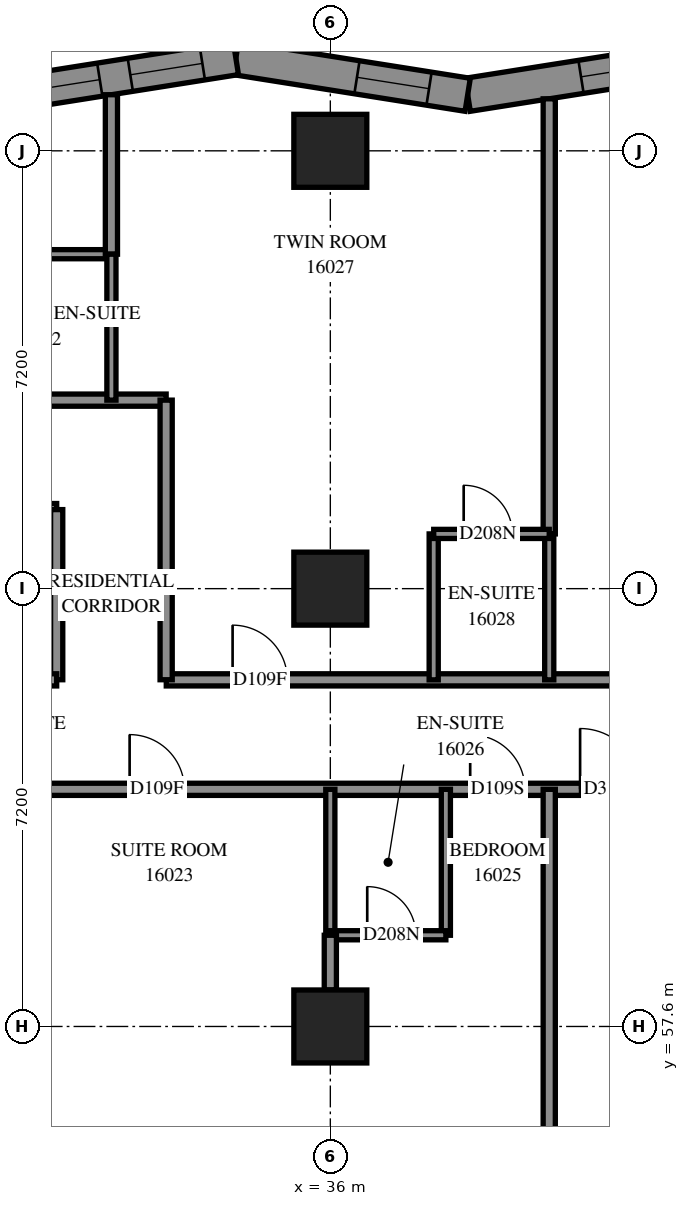
"""IFC4 building model, lengths in metres.
Left out: names, types, materials, properties, quantities, classifications, styles, units other than length and angle.
Written with IfcOpenShell. Run it as: python <this file> out.ifc"""

import sys

from ifc_helpers import new_model, si_unit, direction, frame, frame_2d, origin, origin_2d, place, context, subcontext, project, spatial, polyline, rectangle, outline, extrude, element, fill, save


model = new_model("IFC4")
c1 = context("Model", 3, precision=1e-05, world=origin(), true_north=direction((0.0, 1.0)))
c2 = subcontext(c1, "Body", "Model", "MODEL_VIEW")
j1 = project(units=[si_unit("LENGTHUNIT", "METRE"), si_unit("PLANEANGLEUNIT", "RADIAN")], contexts=[c1])
p1 = place(None, origin())
s1 = spatial("IfcSite", under=j1, at=p1, CompositionType="ELEMENT")
p2 = place(p1, origin())
s2 = spatial("IfcBuilding", under=s1, at=p2, CompositionType="ELEMENT")
p3 = place(p2, frame((0.0, 0.0, 61.0)))
s3 = spatial("IfcBuildingStorey", under=s2, at=p3, CompositionType="ELEMENT", Elevation=61.0)
for number, where, z_axis, x_axis in (
    (1, (36.0, 57.6, 0.0), (0.0, 0.0, 1.0), (1.0, 0.0, 0.0)),
    (2, (36.0, 64.8, 0.0), (0.0, 0.0, 1.0), (1.0, 0.0, 0.0)),
    (3, (36.0, 72.0, 0.0), (0.0, 0.0, 1.0), (1.0, 0.0, 0.0)),
):
    element("IfcColumn", number, at=place(p3, frame(where, z_axis=z_axis, x_axis=x_axis)), inside=s3, PredefinedType="COLUMN", context=c2, shape_type="SweptSolid", body=[
        extrude(rectangle(XDim=1.2, YDim=1.2, at=origin_2d()), origin(), (0.0, 0.0, 1.0), 3.1),
    ])
p4 = place(p3, frame((42.071, 73.525, 0.0), z_axis=(0.0, 0.0, 1.0), x_axis=(-0.9877213372, -0.1562259905, 0.0)))
e4 = element("IfcWall", 4, at=p4, inside=s3, PredefinedType="SOLIDWALL", context=c2, shape_type="SweptSolid", body=[
    extrude(outline(polyline([(-0.043, -0.275), (3.816, -0.275), (3.903, 0.275), (0.043, 0.275), (-0.043, -0.275)])), origin(), (0.0, 0.0, 1.0), 3.1),
])
p5 = place(p4, frame((0.773, 0.0, 0.5)))
e5 = element("IfcOpeningElement", 5, at=p5, cuts=e4, PredefinedType="OPENING", context=c2, shape_type="SweptSolid", body=[
    extrude(rectangle(XDim=1.2, YDim=2.45, at=frame_2d((0.6, 1.225))), frame((0.0, 0.285, 0.0), z_axis=(0.0, -1.0, 0.0), x_axis=(1.0, 0.0, 0.0)), (0.0, 0.0, 1.0), 0.57),
])
p6 = place(p3, frame((38.259, 72.922, 0.0), z_axis=(0.0, 0.0, 1.0), x_axis=(-0.9877213372, 0.1562259905, 0.0)))
e6 = element("IfcWall", 6, at=p6, inside=s3, PredefinedType="SOLIDWALL", context=c2, shape_type="SweptSolid", body=[
    extrude(outline(polyline([(0.043, -0.275), (3.903, -0.275), (3.816, 0.275), (-0.043, 0.275), (0.043, -0.275)])), origin(), (0.0, 0.0, 1.0), 3.1),
])
p7 = place(p6, frame((0.643, 0.0, 0.5)))
e7 = element("IfcOpeningElement", 7, at=p7, cuts=e6, PredefinedType="OPENING", context=c2, shape_type="SweptSolid", body=[
    extrude(rectangle(XDim=1.2, YDim=2.45, at=frame_2d((0.6, 1.225))), frame((0.0, 0.285, 0.0), z_axis=(0.0, -1.0, 0.0), x_axis=(1.0, 0.0, 0.0)), (0.0, 0.0, 1.0), 0.57),
])
p8 = place(p3, frame((34.447, 73.525, 0.0), z_axis=(0.0, 0.0, 1.0), x_axis=(-0.9877213372, -0.1562259905, 0.0)))
e8 = element("IfcWall", 8, at=p8, inside=s3, PredefinedType="SOLIDWALL", context=c2, shape_type="SweptSolid", body=[
    extrude(outline(polyline([(-0.043, -0.275), (3.816, -0.275), (3.903, 0.275), (0.043, 0.275), (-0.043, -0.275)])), origin(), (0.0, 0.0, 1.0), 3.1),
])
p9 = place(p8, frame((0.558, 0.0, 0.5)))
e9 = element("IfcOpeningElement", 9, at=p9, cuts=e8, PredefinedType="OPENING", context=c2, shape_type="SweptSolid", body=[
    extrude(rectangle(XDim=1.2, YDim=2.45, at=frame_2d((0.6, 1.225))), frame((0.0, 0.285, 0.0), z_axis=(0.0, -1.0, 0.0), x_axis=(1.0, 0.0, 0.0)), (0.0, 0.0, 1.0), 0.57),
])
p10 = place(p8, frame((2.266, 0.0, 0.5)))
e10 = element("IfcOpeningElement", 10, at=p10, cuts=e8, PredefinedType="OPENING", context=c2, shape_type="SweptSolid", body=[
    extrude(rectangle(XDim=1.2, YDim=2.45, at=frame_2d((0.6, 1.225))), frame((0.0, 0.285, 0.0), z_axis=(0.0, -1.0, 0.0), x_axis=(1.0, 0.0, 0.0)), (0.0, 0.0, 1.0), 0.57),
])
p11 = place(p3, frame((28.8, 61.5, 0.0), z_axis=(0.0, 0.0, 1.0), x_axis=(1.0, 0.0, 0.0)))
e11 = element("IfcWall", 11, at=p11, inside=s3, PredefinedType="PARTITIONING", context=c2, shape_type="SweptSolid", body=[
    extrude(rectangle(XDim=24.3, YDim=0.2, at=frame_2d((12.15, 0.0))), origin(), (0.0, 0.0, 1.0), 3.1),
])
p12 = place(p11, frame((3.899, 0.0, 0.0)))
e12 = element("IfcOpeningElement", 12, at=p12, cuts=e11, PredefinedType="OPENING", context=c2, shape_type="SweptSolid", body=[
    extrude(rectangle(XDim=0.9, YDim=2.1, at=frame_2d((0.45, 1.05))), frame((0.0, 0.11, 0.0), z_axis=(0.0, -1.0, 0.0), x_axis=(1.0, 0.0, 0.0)), (0.0, 0.0, 1.0), 0.22),
])
p13 = place(p11, frame((9.5, 0.0, 0.0)))
e13 = element("IfcOpeningElement", 13, at=p13, cuts=e11, PredefinedType="OPENING", context=c2, shape_type="SweptSolid", body=[
    extrude(rectangle(XDim=0.9, YDim=2.1, at=frame_2d((0.45, 1.05))), frame((0.0, 0.11, 0.0), z_axis=(0.0, -1.0, 0.0), x_axis=(1.0, 0.0, 0.0)), (0.0, 0.0, 1.0), 0.22),
])
p14 = place(p11, frame((11.307, 0.0, 0.0)))
e14 = element("IfcOpeningElement", 14, at=p14, cuts=e11, PredefinedType="OPENING", context=c2, shape_type="SweptSolid", body=[
    extrude(rectangle(XDim=1.0, YDim=2.1, at=frame_2d((0.5, 1.05))), frame((0.0, 0.11, 0.0), z_axis=(0.0, -1.0, 0.0), x_axis=(1.0, 0.0, 0.0)), (0.0, 0.0, 1.0), 0.22),
])
p15 = place(p11, frame((16.7, 0.0, 0.0)))
e15 = element("IfcOpeningElement", 15, at=p15, cuts=e11, PredefinedType="OPENING", context=c2, shape_type="SweptSolid", body=[
    extrude(rectangle(XDim=0.9, YDim=2.1, at=frame_2d((0.45, 1.05))), frame((0.0, 0.11, 0.0), z_axis=(0.0, -1.0, 0.0), x_axis=(1.0, 0.0, 0.0)), (0.0, 0.0, 1.0), 0.22),
])
p16 = place(p11, frame((18.508, 0.0, 0.0)))
e16 = element("IfcOpeningElement", 16, at=p16, cuts=e11, PredefinedType="OPENING", context=c2, shape_type="SweptSolid", body=[
    extrude(rectangle(XDim=1.0, YDim=2.1, at=frame_2d((0.5, 1.05))), frame((0.0, 0.11, 0.0), z_axis=(0.0, -1.0, 0.0), x_axis=(1.0, 0.0, 0.0)), (0.0, 0.0, 1.0), 0.22),
])
p17 = place(p11, frame((23.033, 0.0, 0.0)))
e17 = element("IfcOpeningElement", 17, at=p17, cuts=e11, PredefinedType="OPENING", context=c2, shape_type="SweptSolid", body=[
    extrude(rectangle(XDim=1.0, YDim=2.1, at=frame_2d((0.5, 1.05))), frame((0.0, 0.11, 0.0), z_axis=(0.0, -1.0, 0.0), x_axis=(1.0, 0.0, 0.0)), (0.0, 0.0, 1.0), 0.22),
])
p18 = place(p3, frame((33.302, 63.3, 0.0), z_axis=(0.0, 0.0, 1.0), x_axis=(1.0, 0.0, 0.0)))
e18 = element("IfcWall", 18, at=p18, inside=s3, PredefinedType="PARTITIONING", context=c2, shape_type="SweptSolid", body=[
    extrude(rectangle(XDim=21.798, YDim=0.2, at=frame_2d((10.899, 0.0))), origin(), (0.0, 0.0, 1.0), 3.1),
])
p19 = place(p18, frame((1.091, 0.0, 0.0)))
e19 = element("IfcOpeningElement", 19, at=p19, cuts=e18, PredefinedType="OPENING", context=c2, shape_type="SweptSolid", body=[
    extrude(rectangle(XDim=0.9, YDim=2.1, at=frame_2d((0.45, 1.05))), frame((0.0, 0.11, 0.0), z_axis=(0.0, -1.0, 0.0), x_axis=(1.0, 0.0, 0.0)), (0.0, 0.0, 1.0), 0.22),
])
p20 = place(p18, frame((8.248, 0.0, 0.0)))
e20 = element("IfcOpeningElement", 20, at=p20, cuts=e18, PredefinedType="OPENING", context=c2, shape_type="SweptSolid", body=[
    extrude(rectangle(XDim=0.9, YDim=2.1, at=frame_2d((0.45, 1.05))), frame((0.0, 0.11, 0.0), z_axis=(0.0, -1.0, 0.0), x_axis=(1.0, 0.0, 0.0)), (0.0, 0.0, 1.0), 0.22),
])
p21 = place(p18, frame((15.448, 0.0, 0.0)))
e21 = element("IfcOpeningElement", 21, at=p21, cuts=e18, PredefinedType="OPENING", context=c2, shape_type="SweptSolid", body=[
    extrude(rectangle(XDim=0.9, YDim=2.1, at=frame_2d((0.45, 1.05))), frame((0.0, 0.11, 0.0), z_axis=(0.0, -1.0, 0.0), x_axis=(1.0, 0.0, 0.0)), (0.0, 0.0, 1.0), 0.22),
])
p22 = place(p3, frame((21.602, 67.9, 0.0), z_axis=(0.0, 0.0, 1.0), x_axis=(1.0, 0.0, 0.0)))
e22 = element("IfcWall", 22, at=p22, inside=s3, PredefinedType="PARTITIONING", context=c2, shape_type="SweptSolid", body=[
    extrude(rectangle(XDim=11.698, YDim=0.2, at=frame_2d((5.849, 0.0))), origin(), (0.0, 0.0, 1.0), 3.1),
])
p23 = place(p22, frame((5.955, 0.0, 0.0)))
e23 = element("IfcOpeningElement", 23, at=p23, cuts=e22, PredefinedType="OPENING", context=c2, shape_type="SweptSolid", body=[
    extrude(rectangle(XDim=0.9, YDim=2.1, at=frame_2d((0.45, 1.05))), frame((0.0, 0.11, 0.0), z_axis=(0.0, -1.0, 0.0), x_axis=(1.0, 0.0, 0.0)), (0.0, 0.0, 1.0), 0.22),
])
p24 = place(p3, frame((21.6, 66.1, 0.0), z_axis=(0.0, 0.0, 1.0), x_axis=(1.0, 0.0, 0.0)))
e24 = element("IfcWall", 24, at=p24, inside=s3, PredefinedType="PARTITIONING", context=c2, shape_type="SweptSolid", body=[
    extrude(rectangle(XDim=9.9, YDim=0.2, at=frame_2d((4.95, 0.0))), origin(), (0.0, 0.0, 1.0), 3.1),
])
p25 = place(p24, frame((5.314, 0.0, 0.0)))
e25 = element("IfcOpeningElement", 25, at=p25, cuts=e24, PredefinedType="OPENING", context=c2, shape_type="SweptSolid", body=[
    extrude(rectangle(XDim=1.0, YDim=2.1, at=frame_2d((0.5, 1.05))), frame((0.0, 0.11, 0.0), z_axis=(0.0, -1.0, 0.0), x_axis=(1.0, 0.0, 0.0)), (0.0, 0.0, 1.0), 0.22),
])
p26 = place(p3, frame((39.6, 65.7, 0.0), z_axis=(0.0, 0.0, 1.0), x_axis=(0.0, 1.0, 0.0)))
e26 = element("IfcWall", 26, at=p26, inside=s3, PredefinedType="PARTITIONING", context=c2, shape_type="SweptSolid", body=[
    extrude(rectangle(XDim=7.155, YDim=0.2, at=frame_2d((3.578, 0.0))), origin(), (0.0, 0.0, 1.0), 3.1),
])
p27 = place(p3, frame((39.6, 55.747, 0.0), z_axis=(0.0, 0.0, 1.0), x_axis=(0.0, 1.0, 0.0)))
e27 = element("IfcWall", 27, at=p27, inside=s3, PredefinedType="PARTITIONING", context=c2, shape_type="SweptSolid", body=[
    extrude(rectangle(XDim=5.753, YDim=0.2, at=frame_2d((2.877, 0.0))), origin(), (0.0, 0.0, 1.0), 3.1),
])
p28 = place(p3, frame((33.3, 63.302, 0.0), z_axis=(0.0, 0.0, 1.0), x_axis=(0.0, 1.0, 0.0)))
e28 = element("IfcWall", 28, at=p28, inside=s3, PredefinedType="PARTITIONING", context=c2, shape_type="SweptSolid", body=[
    extrude(rectangle(XDim=4.598, YDim=0.2, at=frame_2d((2.299, 0.0))), origin(), (0.0, 0.0, 1.0), 3.1),
])
p29 = place(p3, frame((29.2, 70.3, 0.0), z_axis=(0.0, 0.0, 1.0), x_axis=(1.0, 0.0, 0.0)))
e29 = element("IfcWall", 29, at=p29, inside=s3, PredefinedType="PARTITIONING", context=c2, shape_type="SweptSolid", body=[
    extrude(rectangle(XDim=3.2, YDim=0.15, at=frame_2d((1.6, 0.0))), origin(), (0.0, 0.0, 1.0), 3.1),
])
p30 = place(p29, frame((1.204, 0.0, 0.0)))
e30 = element("IfcOpeningElement", 30, at=p30, cuts=e29, PredefinedType="OPENING", context=c2, shape_type="SweptSolid", body=[
    extrude(rectangle(XDim=0.8, YDim=2.1, at=frame_2d((0.4, 1.05))), frame((0.0, 0.085, 0.0), z_axis=(0.0, -1.0, 0.0), x_axis=(1.0, 0.0, 0.0)), (0.0, 0.0, 1.0), 0.17),
])
p31 = place(p3, frame((31.5, 63.302, 0.0), z_axis=(0.0, 0.0, 1.0), x_axis=(0.0, 1.0, 0.0)))
e31 = element("IfcWall", 31, at=p31, inside=s3, PredefinedType="PARTITIONING", context=c2, shape_type="SweptSolid", body=[
    extrude(rectangle(XDim=2.798, YDim=0.2, at=frame_2d((1.399, 0.0))), origin(), (0.0, 0.0, 1.0), 3.1),
])
p32 = place(p3, frame((28.802, 63.3, 0.0), z_axis=(0.0, 0.0, 1.0), x_axis=(1.0, 0.0, 0.0)))
e32 = element("IfcWall", 32, at=p32, inside=s3, PredefinedType="PARTITIONING", context=c2, shape_type="SweptSolid", body=[
    extrude(rectangle(XDim=2.698, YDim=0.2, at=frame_2d((1.349, 0.0))), origin(), (0.0, 0.0, 1.0), 3.1),
])
p33 = place(p3, frame((32.4, 70.3, 0.0), z_axis=(0.0, 0.0, 1.0), x_axis=(0.0, 1.0, 0.0)))
e33 = element("IfcWall", 33, at=p33, inside=s3, PredefinedType="PARTITIONING", context=c2, shape_type="SweptSolid", body=[
    extrude(rectangle(XDim=2.623, YDim=0.2, at=frame_2d((1.311, 0.0))), origin(), (0.0, 0.0, 1.0), 3.1),
])
for number, where, z_axis, x_axis in (
    (34, (37.7, 63.3, 0.0), (0.0, 0.0, 1.0), (0.0, 1.0, 0.0)),
    (35, (39.6, 63.3, 0.0), (0.0, 0.0, 1.0), (0.0, 1.0, 0.0)),
    (36, (37.9, 59.1, 0.0), (0.0, 0.0, 1.0), (0.0, 1.0, 0.0)),
    (37, (36.0, 59.1, 0.0), (0.0, 0.0, 1.0), (0.0, 1.0, 0.0)),
    (38, (32.4, 67.9, 0.0), (0.0, 0.0, 1.0), (0.0, 1.0, 0.0)),
):
    element("IfcWall", number, at=place(p3, frame(where, z_axis=z_axis, x_axis=x_axis)), inside=s3, PredefinedType="PARTITIONING", context=c2, shape_type="SweptSolid", body=[
        extrude(rectangle(XDim=2.4, YDim=0.15, at=frame_2d((1.2, 0.0))), origin(), (0.0, 0.0, 1.0), 3.1),
    ])
p34 = place(p3, frame((36.0, 59.1, 0.0), z_axis=(0.0, 0.0, 1.0), x_axis=(1.0, 0.0, 0.0)))
e39 = element("IfcWall", 39, at=p34, inside=s3, PredefinedType="PARTITIONING", context=c2, shape_type="SweptSolid", body=[
    extrude(rectangle(XDim=1.9, YDim=0.15, at=frame_2d((0.95, 0.0))), origin(), (0.0, 0.0, 1.0), 3.1),
])
p35 = place(p34, frame((0.607, 0.0, 0.0)))
e40 = element("IfcOpeningElement", 40, at=p35, cuts=e39, PredefinedType="OPENING", context=c2, shape_type="SweptSolid", body=[
    extrude(rectangle(XDim=0.8, YDim=2.1, at=frame_2d((0.4, 1.05))), frame((0.0, 0.085, 0.0), z_axis=(0.0, -1.0, 0.0), x_axis=(1.0, 0.0, 0.0)), (0.0, 0.0, 1.0), 0.17),
])
p36 = place(p3, frame((37.7, 65.7, 0.0), z_axis=(0.0, 0.0, 1.0), x_axis=(1.0, 0.0, 0.0)))
e41 = element("IfcWall", 41, at=p36, inside=s3, PredefinedType="PARTITIONING", context=c2, shape_type="SweptSolid", body=[
    extrude(rectangle(XDim=1.9, YDim=0.15, at=frame_2d((0.95, 0.0))), origin(), (0.0, 0.0, 1.0), 3.1),
])
p37 = place(p36, frame((0.493, 0.0, 0.0)))
e42 = element("IfcOpeningElement", 42, at=p37, cuts=e41, PredefinedType="OPENING", context=c2, shape_type="SweptSolid", body=[
    extrude(rectangle(XDim=0.8, YDim=2.1, at=frame_2d((0.4, 1.05))), frame((0.0, 0.085, 0.0), z_axis=(0.0, -1.0, 0.0), x_axis=(1.0, 0.0, 0.0)), (0.0, 0.0, 1.0), 0.17),
])
p38 = place(p3, frame((36.0, 58.2, 0.0), z_axis=(0.0, 0.0, 1.0), x_axis=(0.0, 1.0, 0.0)))
e43 = element("IfcWall", 43, at=p38, inside=s3, PredefinedType="PARTITIONING", context=c2, shape_type="SweptSolid", body=[
    extrude(rectangle(XDim=0.9, YDim=0.2, at=frame_2d((0.45, 0.0))), origin(), (0.0, 0.0, 1.0), 3.1),
])
p39 = place(p5, origin())
e44 = element("IfcWindow", 44, at=p39, inside=s3, PartitioningType="SINGLE_PANEL", PredefinedType="WINDOW", context=c2, shape_type="SweptSolid", body=[
    extrude(rectangle(XDim=1.2, YDim=2.45, at=frame_2d((0.6, 1.225))), frame((0.0, 0.155, 0.0), z_axis=(0.0, -1.0, 0.0), x_axis=(1.0, 0.0, 0.0)), (0.0, 0.0, 1.0), 0.06),
])
fill(e5, e44)
p40 = place(p7, origin())
e45 = element("IfcWindow", 45, at=p40, inside=s3, PartitioningType="SINGLE_PANEL", PredefinedType="WINDOW", context=c2, shape_type="SweptSolid", body=[
    extrude(rectangle(XDim=1.2, YDim=2.45, at=frame_2d((0.6, 1.225))), frame((0.0, 0.155, 0.0), z_axis=(0.0, -1.0, 0.0), x_axis=(1.0, 0.0, 0.0)), (0.0, 0.0, 1.0), 0.06),
])
fill(e7, e45)
p41 = place(p9, origin())
e46 = element("IfcWindow", 46, at=p41, inside=s3, PartitioningType="SINGLE_PANEL", PredefinedType="WINDOW", context=c2, shape_type="SweptSolid", body=[
    extrude(rectangle(XDim=1.2, YDim=2.45, at=frame_2d((0.6, 1.225))), frame((0.0, 0.155, 0.0), z_axis=(0.0, -1.0, 0.0), x_axis=(1.0, 0.0, 0.0)), (0.0, 0.0, 1.0), 0.06),
])
fill(e9, e46)
p42 = place(p10, origin())
e47 = element("IfcWindow", 47, at=p42, inside=s3, PartitioningType="SINGLE_PANEL", PredefinedType="WINDOW", context=c2, shape_type="SweptSolid", body=[
    extrude(rectangle(XDim=1.2, YDim=2.45, at=frame_2d((0.6, 1.225))), frame((0.0, 0.155, 0.0), z_axis=(0.0, -1.0, 0.0), x_axis=(1.0, 0.0, 0.0)), (0.0, 0.0, 1.0), 0.06),
])
fill(e10, e47)
p43 = place(p12, origin())
e48 = element("IfcDoor", 48, at=p43, inside=s3, OperationType="SINGLE_SWING_LEFT", PredefinedType="DOOR", context=c2, shape_type="SweptSolid", body=[
    extrude(rectangle(XDim=0.9, YDim=2.1, at=frame_2d((0.45, 1.05))), frame((0.0, 0.025, 0.0), z_axis=(0.0, -1.0, 0.0), x_axis=(1.0, 0.0, 0.0)), (0.0, 0.0, 1.0), 0.05),
])
fill(e12, e48)
p44 = place(p13, origin())
e49 = element("IfcDoor", 49, at=p44, inside=s3, OperationType="SINGLE_SWING_LEFT", PredefinedType="DOOR", context=c2, shape_type="SweptSolid", body=[
    extrude(rectangle(XDim=0.9, YDim=2.1, at=frame_2d((0.45, 1.05))), frame((0.0, 0.025, 0.0), z_axis=(0.0, -1.0, 0.0), x_axis=(1.0, 0.0, 0.0)), (0.0, 0.0, 1.0), 0.05),
])
fill(e13, e49)
p45 = place(p35, origin())
e50 = element("IfcDoor", 50, at=p45, inside=s3, OperationType="SINGLE_SWING_RIGHT", PredefinedType="DOOR", context=c2, shape_type="SweptSolid", body=[
    extrude(rectangle(XDim=0.8, YDim=2.1, at=frame_2d((0.4, 1.05))), frame((0.0, 0.025, 0.0), z_axis=(0.0, -1.0, 0.0), x_axis=(1.0, 0.0, 0.0)), (0.0, 0.0, 1.0), 0.05),
])
fill(e40, e50)
p46 = place(p19, origin())
e51 = element("IfcDoor", 51, at=p46, inside=s3, OperationType="SINGLE_SWING_LEFT", PredefinedType="DOOR", context=c2, shape_type="SweptSolid", body=[
    extrude(rectangle(XDim=0.9, YDim=2.1, at=frame_2d((0.45, 1.05))), frame((0.0, 0.025, 0.0), z_axis=(0.0, -1.0, 0.0), x_axis=(1.0, 0.0, 0.0)), (0.0, 0.0, 1.0), 0.05),
])
fill(e19, e51)
p47 = place(p37, origin())
e52 = element("IfcDoor", 52, at=p47, inside=s3, OperationType="SINGLE_SWING_RIGHT", PredefinedType="DOOR", context=c2, shape_type="SweptSolid", body=[
    extrude(rectangle(XDim=0.8, YDim=2.1, at=frame_2d((0.4, 1.05))), frame((0.0, 0.025, 0.0), z_axis=(0.0, -1.0, 0.0), x_axis=(1.0, 0.0, 0.0)), (0.0, 0.0, 1.0), 0.05),
])
fill(e42, e52)
p48 = place(p14, origin())
e53 = element("IfcDoor", 53, at=p48, inside=s3, OperationType="SINGLE_SWING_RIGHT", PredefinedType="DOOR", context=c2, shape_type="SweptSolid", body=[
    extrude(rectangle(XDim=1.0, YDim=2.1, at=frame_2d((0.5, 1.05))), frame((0.0, 0.025, 0.0), z_axis=(0.0, -1.0, 0.0), x_axis=(1.0, 0.0, 0.0)), (0.0, 0.0, 1.0), 0.05),
])
fill(e14, e53)
save(model, sys.argv[1])
